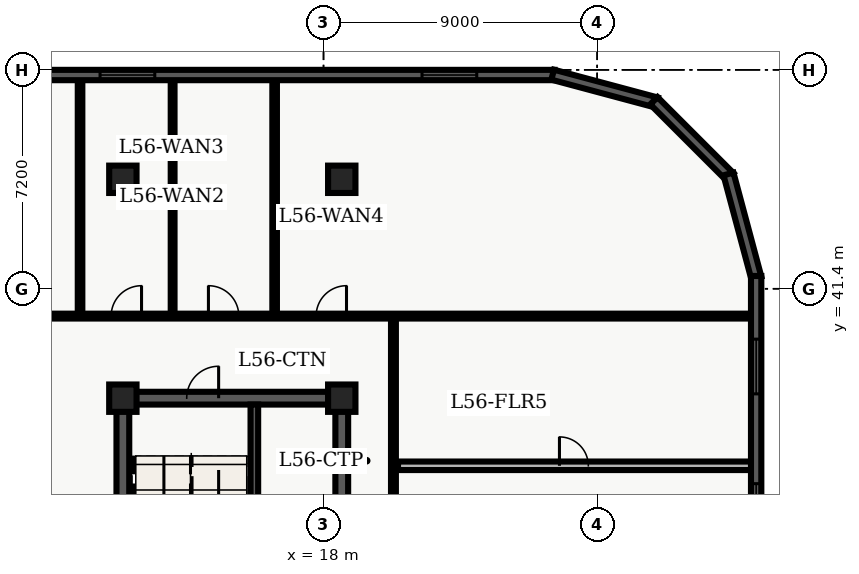
"""IFC4 building model, lengths in metres.
Left out: names, types, materials, properties, quantities, classifications, styles, units other than length and angle.
Written with IfcOpenShell. Run it as: python <this file> out.ifc"""

import sys

from ifc_helpers import new_model, entity, si_unit, converted_unit, direction, frame, origin_with_axes, origin_2d_with_axis, place, context, subcontext, project, spatial, polyline, rectangle, outline, extrude, element, fill, save


model = new_model("IFC4")
c1 = context("Model", 3, precision=1e-05, world=origin_with_axes(), true_north=direction((0.0, 1.0)))
c2 = subcontext(c1, "Body", "Model", "MODEL_VIEW")
j1 = project(units=[si_unit("LENGTHUNIT", "METRE"), converted_unit("PLANEANGLEUNIT", "DEGREE", entity("IfcPlaneAngleMeasure", 0.017), si_unit("PLANEANGLEUNIT", "RADIAN"), dimensions=[0, 0, 0, 0, 0, 0, 0])], contexts=[c1])
p1 = place(None, origin_with_axes())
s1 = spatial("IfcSite", under=j1, at=p1, CompositionType="ELEMENT")
p2 = place(p1, origin_with_axes())
s2 = spatial("IfcBuilding", under=s1, at=p2, CompositionType="ELEMENT")
p3 = place(p2, frame((0.0, 0.0, 228.6), z_axis=(0.0, 0.0, 1.0), x_axis=(1.0, 0.0, 0.0)))
s3 = spatial("IfcBuildingStorey", under=s2, at=p3, CompositionType="ELEMENT", Elevation=228.6)
p4 = place(p3, frame((11.4, 10.8, 0.0), z_axis=(0.0, 0.0, 1.0), x_axis=(0.0, 1.0, 0.0)))
e1 = element("IfcWall", 1, at=p4, inside=s3, PredefinedType="SHEAR", context=c2, shape_type="SweptSolid", body=[
    extrude(outline(polyline([(0.0, -0.21), (27.0, -0.21), (27.0, 0.21), (0.0, 0.21), (0.0, -0.21)])), origin_with_axes(), (0.0, 0.0, 1.0), 3.66),
])
p5 = place(p3, frame((11.4, 37.8, 0.0), z_axis=(0.0, 0.0, 1.0), x_axis=(1.0, 0.0, 0.0)))
e2 = element("IfcWall", 2, at=p5, inside=s3, PredefinedType="SHEAR", context=c2, shape_type="SweptSolid", body=[
    extrude(outline(polyline([(0.0, -0.21), (7.2, -0.21), (7.2, 0.21), (0.0, 0.21), (0.0, -0.21)])), origin_with_axes(), (0.0, 0.0, 1.0), 3.66),
])
p6 = place(p5, frame((2.625, 0.0, 0.0), z_axis=(0.0, 0.0, 1.0), x_axis=(1.0, 0.0, 0.0)))
e3 = element("IfcOpeningElement", 3, at=p6, cuts=e2, PredefinedType="OPENING", context=c2, shape_type="SweptSolid", body=[
    extrude(rectangle(XDim=1.05, YDim=0.44, at=origin_2d_with_axis()), origin_with_axes(), (0.0, 0.0, 1.0), 2.15),
])
p7 = place(p3, frame((18.6, 24.3, 0.0), z_axis=(0.0, 0.0, 1.0), x_axis=(0.0, 1.0, 0.0)))
e4 = element("IfcWall", 4, at=p7, inside=s3, PredefinedType="SHEAR", context=c2, shape_type="SweptSolid", body=[
    extrude(outline(polyline([(0.0, -0.21), (13.5, -0.21), (13.5, 0.21), (0.0, 0.21), (0.0, -0.21)])), origin_with_axes(), (0.0, 0.0, 1.0), 3.66),
])
p8 = place(p7, frame((8.525, 0.0, 0.0), z_axis=(0.0, 0.0, 1.0), x_axis=(1.0, 0.0, 0.0)))
e5 = element("IfcOpeningElement", 5, at=p8, cuts=e4, PredefinedType="OPENING", context=c2, shape_type="SweptSolid", body=[
    extrude(rectangle(XDim=1.05, YDim=0.44, at=origin_2d_with_axis()), origin_with_axes(), (0.0, 0.0, 1.0), 2.15),
])
p9 = place(p3, frame((15.725, 28.9, 0.0), z_axis=(0.0, 0.0, 1.0), x_axis=(0.0, 1.0, 0.0)))
e6 = element("IfcWall", 6, at=p9, inside=s3, PredefinedType="SHEAR", context=c2, shape_type="SweptSolid", body=[
    extrude(outline(polyline([(0.0, -0.125), (8.69, -0.125), (8.69, 0.125), (0.0, 0.125), (0.0, -0.125)])), origin_with_axes(), (0.0, 0.0, 1.0), 3.66),
])
for number, where, z_axis, x_axis in (
    (7, (11.4, 37.8, 0.0), (0.0, 0.0, 1.0), (1.0, 0.0, 0.0)),
    (8, (11.4, 45.0, 0.0), (0.0, 0.0, 1.0), (1.0, 0.0, 0.0)),
    (9, (18.6, 37.8, 0.0), (0.0, 0.0, 1.0), (1.0, 0.0, 0.0)),
    (10, (18.6, 45.0, 0.0), (0.0, 0.0, 1.0), (1.0, 0.0, 0.0)),
):
    element("IfcColumn", number, at=place(p3, frame(where, z_axis=z_axis, x_axis=x_axis)), inside=s3, PredefinedType="COLUMN", context=c2, shape_type="SweptSolid", body=[
        extrude(rectangle(XDim=0.9, YDim=0.9, at=origin_2d_with_axis()), origin_with_axes(), (0.0, 0.0, 1.0), 3.9),
    ])
p10 = place(p3, frame((7.1, 40.5, 0.0), z_axis=(0.0, 0.0, 1.0), x_axis=(1.0, 0.0, 0.0)))
e11 = element("IfcWall", 11, at=p10, inside=s3, PredefinedType="PARTITIONING", context=c2, shape_type="SweptSolid", body=[
    extrude(outline(polyline([(0.0, -0.08), (24.965, -0.08), (24.965, 0.08), (0.0, 0.08), (0.0, -0.08)])), origin_with_axes(), (0.0, 0.0, 1.0), 2.7),
])
p11 = place(p10, frame((1.441, 0.0, 0.0), z_axis=(0.0, 0.0, 1.0), x_axis=(1.0, 0.0, 0.0)))
e12 = element("IfcOpeningElement", 12, at=p11, cuts=e11, PredefinedType="OPENING", context=c2, shape_type="SweptSolid", body=[
    extrude(rectangle(XDim=1.0, YDim=0.18, at=origin_2d_with_axis()), origin_with_axes(), (0.0, 0.0, 1.0), 2.15),
])
p12 = place(p10, frame((4.415, 0.0, 0.0), z_axis=(0.0, 0.0, 1.0), x_axis=(1.0, 0.0, 0.0)))
e13 = element("IfcOpeningElement", 13, at=p12, cuts=e11, PredefinedType="OPENING", context=c2, shape_type="SweptSolid", body=[
    extrude(rectangle(XDim=1.0, YDim=0.18, at=origin_2d_with_axis()), origin_with_axes(), (0.0, 0.0, 1.0), 2.15),
])
p13 = place(p10, frame((7.614, 0.0, 0.0), z_axis=(0.0, 0.0, 1.0), x_axis=(1.0, 0.0, 0.0)))
e14 = element("IfcOpeningElement", 14, at=p13, cuts=e11, PredefinedType="OPENING", context=c2, shape_type="SweptSolid", body=[
    extrude(rectangle(XDim=1.0, YDim=0.18, at=origin_2d_with_axis()), origin_with_axes(), (0.0, 0.0, 1.0), 2.15),
])
p14 = place(p10, frame((11.156, 0.0, 0.0), z_axis=(0.0, 0.0, 1.0), x_axis=(1.0, 0.0, 0.0)))
e15 = element("IfcOpeningElement", 15, at=p14, cuts=e11, PredefinedType="OPENING", context=c2, shape_type="SweptSolid", body=[
    extrude(rectangle(XDim=1.0, YDim=0.18, at=origin_2d_with_axis()), origin_with_axes(), (0.0, 0.0, 1.0), 2.15),
])
p15 = place(p3, frame((20.3, 7.8, 0.0), z_axis=(0.0, 0.0, 1.0), x_axis=(0.0, 1.0, 0.0)))
e16 = element("IfcWall", 16, at=p15, inside=s3, PredefinedType="PARTITIONING", context=c2, shape_type="SweptSolid", body=[
    extrude(outline(polyline([(0.0, -0.08), (32.7, -0.08), (32.7, 0.08), (0.0, 0.08), (0.0, -0.08)])), origin_with_axes(), (0.0, 0.0, 1.0), 2.7),
])
p16 = place(p15, frame((14.556, 0.0, 0.0), z_axis=(0.0, 0.0, 1.0), x_axis=(1.0, 0.0, 0.0)))
e17 = element("IfcOpeningElement", 17, at=p16, cuts=e16, PredefinedType="OPENING", context=c2, shape_type="SweptSolid", body=[
    extrude(rectangle(XDim=0.9, YDim=0.18, at=origin_2d_with_axis()), origin_with_axes(), (0.0, 0.0, 1.0), 2.15),
])
p17 = place(p15, frame((18.551, 0.0, 0.0), z_axis=(0.0, 0.0, 1.0), x_axis=(1.0, 0.0, 0.0)))
e18 = element("IfcOpeningElement", 18, at=p17, cuts=e16, PredefinedType="OPENING", context=c2, shape_type="SweptSolid", body=[
    extrude(rectangle(XDim=1.0, YDim=0.18, at=origin_2d_with_axis()), origin_with_axes(), (0.0, 0.0, 1.0), 2.15),
])
p18 = place(p15, frame((22.226, 0.0, 0.0), z_axis=(0.0, 0.0, 1.0), x_axis=(1.0, 0.0, 0.0)))
e19 = element("IfcOpeningElement", 19, at=p18, cuts=e16, PredefinedType="OPENING", context=c2, shape_type="SweptSolid", body=[
    extrude(rectangle(XDim=1.0, YDim=0.18, at=origin_2d_with_axis()), origin_with_axes(), (0.0, 0.0, 1.0), 2.15),
])
p19 = place(p15, frame((25.754, 0.0, 0.0), z_axis=(0.0, 0.0, 1.0), x_axis=(1.0, 0.0, 0.0)))
e20 = element("IfcOpeningElement", 20, at=p19, cuts=e16, PredefinedType="OPENING", context=c2, shape_type="SweptSolid", body=[
    extrude(rectangle(XDim=1.0, YDim=0.18, at=origin_2d_with_axis()), origin_with_axes(), (0.0, 0.0, 1.0), 2.15),
])
p20 = place(p15, frame((5.775, 0.0, 0.0), z_axis=(0.0, 0.0, 1.0), x_axis=(1.0, 0.0, 0.0)))
e21 = element("IfcOpeningElement", 21, at=p20, cuts=e16, PredefinedType="OPENING", context=c2, shape_type="SweptSolid", body=[
    extrude(rectangle(XDim=1.05, YDim=0.18, at=origin_2d_with_axis()), origin_with_axes(), (0.0, 0.0, 1.0), 2.15),
])
p21 = place(p3, frame((9.992, 40.6, 0.0), z_axis=(0.0, 0.0, 1.0), x_axis=(0.0, 1.0, 0.0)))
e22 = element("IfcWall", 22, at=p21, inside=s3, PredefinedType="PARTITIONING", context=c2, shape_type="SweptSolid", body=[
    extrude(outline(polyline([(0.0, -0.075), (7.665, -0.075), (7.665, 0.075), (0.0, 0.075), (0.0, -0.075)])), origin_with_axes(), (0.0, 0.0, 1.0), 2.7),
])
p22 = place(p3, frame((13.037, 40.6, 0.0), z_axis=(0.0, 0.0, 1.0), x_axis=(0.0, 1.0, 0.0)))
e23 = element("IfcWall", 23, at=p22, inside=s3, PredefinedType="PARTITIONING", context=c2, shape_type="SweptSolid", body=[
    extrude(outline(polyline([(0.0, -0.062), (7.665, -0.062), (7.665, 0.062), (0.0, 0.062), (0.0, -0.062)])), origin_with_axes(), (0.0, 0.0, 1.0), 2.7),
])
p23 = place(p3, frame((16.392, 40.6, 0.0), z_axis=(0.0, 0.0, 1.0), x_axis=(0.0, 1.0, 0.0)))
e24 = element("IfcWall", 24, at=p23, inside=s3, PredefinedType="PARTITIONING", context=c2, shape_type="SweptSolid", body=[
    extrude(outline(polyline([(0.0, -0.075), (7.665, -0.075), (7.665, 0.075), (0.0, 0.075), (0.0, -0.075)])), origin_with_axes(), (0.0, 0.0, 1.0), 2.7),
])
p24 = place(p3, frame((20.45, 35.576, 0.0), z_axis=(0.0, 0.0, 1.0), x_axis=(1.0, 0.0, 0.0)))
e25 = element("IfcWall", 25, at=p24, inside=s3, PredefinedType="PARTITIONING", context=c2, shape_type="SweptSolid", body=[
    extrude(outline(polyline([(0.0, -0.14), (11.615, -0.14), (11.615, 0.14), (0.0, 0.14), (0.0, -0.14)])), origin_with_axes(), (0.0, 0.0, 1.0), 2.7),
])
p25 = place(p24, frame((5.785, 0.0, 0.0), z_axis=(0.0, 0.0, 1.0), x_axis=(1.0, 0.0, 0.0)))
e26 = element("IfcOpeningElement", 26, at=p25, cuts=e25, PredefinedType="OPENING", context=c2, shape_type="SweptSolid", body=[
    extrude(rectangle(XDim=0.95, YDim=0.3, at=origin_2d_with_axis()), origin_with_axes(), (0.0, 0.0, 1.0), 2.15),
])
p26 = place(p3, frame((7.24, 48.43, 0.0), z_axis=(0.0, 0.0, 1.0), x_axis=(1.0, 0.0, 0.0)))
e27 = element("IfcWall", 27, at=p26, inside=s3, PredefinedType="SOLIDWALL", context=c2, shape_type="SweptSolid", body=[
    extrude(outline(polyline([(0.0, -0.17), (18.36, -0.17), (18.36, 0.17), (0.0, 0.17), (0.0, -0.17)])), origin_with_axes(), (0.0, 0.0, 1.0), 3.66),
])
p27 = place(p26, frame((4.31, 0.0, 0.45), z_axis=(0.0, 0.0, 1.0), x_axis=(1.0, 0.0, 0.0)))
e28 = element("IfcOpeningElement", 28, at=p27, cuts=e27, PredefinedType="OPENING", context=c2, shape_type="SweptSolid", body=[
    extrude(rectangle(XDim=1.8, YDim=0.36, at=origin_2d_with_axis()), origin_with_axes(), (0.0, 0.0, 1.0), 2.1),
])
p28 = place(p26, frame((14.9, 0.0, 0.45), z_axis=(0.0, 0.0, 1.0), x_axis=(1.0, 0.0, 0.0)))
e29 = element("IfcOpeningElement", 29, at=p28, cuts=e27, PredefinedType="OPENING", context=c2, shape_type="SweptSolid", body=[
    extrude(rectangle(XDim=1.8, YDim=0.36, at=origin_2d_with_axis()), origin_with_axes(), (0.0, 0.0, 1.0), 2.1),
])
p29 = place(p3, frame((25.537, 48.441, 0.0), z_axis=(0.0, 0.0, 1.0), x_axis=(0.965934, -0.258788, 0.0)))
e30 = element("IfcWall", 30, at=p29, inside=s3, PredefinedType="SOLIDWALL", context=c2, shape_type="SweptSolid", body=[
    extrude(outline(polyline([(0.0, -0.17), (3.54, -0.17), (3.54, 0.17), (0.0, 0.17), (0.0, -0.17)])), origin_with_axes(), (0.0, 0.0, 1.0), 3.66),
])
p30 = place(p3, frame((28.866, 47.583, 0.0), z_axis=(0.0, 0.0, 1.0), x_axis=(0.707107, -0.707107, 0.0)))
e31 = element("IfcWall", 31, at=p30, inside=s3, PredefinedType="SOLIDWALL", context=c2, shape_type="SweptSolid", body=[
    extrude(outline(polyline([(0.0, -0.17), (3.54, -0.17), (3.54, 0.17), (0.0, 0.17), (0.0, -0.17)])), origin_with_axes(), (0.0, 0.0, 1.0), 3.66),
])
p31 = place(p3, frame((31.32, 45.175, 0.0), z_axis=(0.0, 0.0, 1.0), x_axis=(0.258788, -0.965934, 0.0)))
e32 = element("IfcWall", 32, at=p31, inside=s3, PredefinedType="SOLIDWALL", context=c2, shape_type="SweptSolid", body=[
    extrude(outline(polyline([(0.0, -0.17), (3.54, -0.17), (3.54, 0.17), (0.0, 0.17), (0.0, -0.17)])), origin_with_axes(), (0.0, 0.0, 1.0), 3.66),
])
p32 = place(p3, frame((32.23, 41.82, 0.0), z_axis=(0.0, 0.0, 1.0), x_axis=(0.0, -1.0, 0.0)))
e33 = element("IfcWall", 33, at=p32, inside=s3, PredefinedType="SOLIDWALL", context=c2, shape_type="SweptSolid", body=[
    extrude(outline(polyline([(0.0, -0.17), (20.22, -0.17), (20.22, 0.17), (0.0, 0.17), (0.0, -0.17)])), origin_with_axes(), (0.0, 0.0, 1.0), 3.66),
])
p33 = place(p32, frame((2.978, 0.0, 0.45), z_axis=(0.0, 0.0, 1.0), x_axis=(1.0, 0.0, 0.0)))
e34 = element("IfcOpeningElement", 34, at=p33, cuts=e33, PredefinedType="OPENING", context=c2, shape_type="SweptSolid", body=[
    extrude(rectangle(XDim=1.8, YDim=0.36, at=origin_2d_with_axis()), origin_with_axes(), (0.0, 0.0, 1.0), 2.1),
])
p34 = place(p32, frame((7.732, 0.0, 0.45), z_axis=(0.0, 0.0, 1.0), x_axis=(1.0, 0.0, 0.0)))
e35 = element("IfcOpeningElement", 35, at=p34, cuts=e33, PredefinedType="OPENING", context=c2, shape_type="SweptSolid", body=[
    extrude(rectangle(XDim=1.8, YDim=0.36, at=origin_2d_with_axis()), origin_with_axes(), (0.0, 0.0, 1.0), 2.1),
])
p35 = place(p32, frame((12.037, 0.0, 0.45), z_axis=(0.0, 0.0, 1.0), x_axis=(1.0, 0.0, 0.0)))
e36 = element("IfcOpeningElement", 36, at=p35, cuts=e33, PredefinedType="OPENING", context=c2, shape_type="SweptSolid", body=[
    extrude(rectangle(XDim=1.8, YDim=0.36, at=origin_2d_with_axis()), origin_with_axes(), (0.0, 0.0, 1.0), 2.1),
])
p36 = place(p5, frame((2.625, 0.0, 0.0), z_axis=(0.0, 0.0, 1.0), x_axis=(1.0, 0.0, 0.0)))
e37 = element("IfcDoor", 37, at=p36, inside=s3, OperationType="SINGLE_SWING_RIGHT", PredefinedType="DOOR", context=c2, shape_type="SweptSolid", body=[
    extrude(rectangle(XDim=1.05, YDim=0.09, at=origin_2d_with_axis()), origin_with_axes(), (0.0, 0.0, 1.0), 2.15),
])
fill(e3, e37)
p37 = place(p10, frame((4.415, 0.0, 0.0), z_axis=(0.0, 0.0, 1.0), x_axis=(1.0, 0.0, 0.0)))
e38 = element("IfcDoor", 38, at=p37, inside=s3, OperationType="SINGLE_SWING_RIGHT", PredefinedType="DOOR", context=c2, shape_type="SweptSolid", body=[
    extrude(rectangle(XDim=1.0, YDim=0.09, at=origin_2d_with_axis()), origin_with_axes(), (0.0, 0.0, 1.0), 2.15),
])
fill(e13, e38)
p38 = place(p10, frame((7.614, 0.0, 0.0), z_axis=(0.0, 0.0, 1.0), x_axis=(1.0, 0.0, 0.0)))
e39 = element("IfcDoor", 39, at=p38, inside=s3, OperationType="SINGLE_SWING_LEFT", PredefinedType="DOOR", context=c2, shape_type="SweptSolid", body=[
    extrude(rectangle(XDim=1.0, YDim=0.09, at=origin_2d_with_axis()), origin_with_axes(), (0.0, 0.0, 1.0), 2.15),
])
fill(e14, e39)
p39 = place(p10, frame((11.156, 0.0, 0.0), z_axis=(0.0, 0.0, 1.0), x_axis=(1.0, 0.0, 0.0)))
e40 = element("IfcDoor", 40, at=p39, inside=s3, OperationType="SINGLE_SWING_RIGHT", PredefinedType="DOOR", context=c2, shape_type="SweptSolid", body=[
    extrude(rectangle(XDim=1.0, YDim=0.09, at=origin_2d_with_axis()), origin_with_axes(), (0.0, 0.0, 1.0), 2.15),
])
fill(e15, e40)
p40 = place(p24, frame((5.785, 0.0, 0.0), z_axis=(0.0, 0.0, 1.0), x_axis=(1.0, 0.0, 0.0)))
e41 = element("IfcDoor", 41, at=p40, inside=s3, OperationType="SINGLE_SWING_LEFT", PredefinedType="DOOR", context=c2, shape_type="SweptSolid", body=[
    extrude(rectangle(XDim=0.95, YDim=0.09, at=origin_2d_with_axis()), origin_with_axes(), (0.0, 0.0, 1.0), 2.15),
])
fill(e26, e41)
p41 = place(p26, frame((4.31, 0.0, 0.45), z_axis=(0.0, 0.0, 1.0), x_axis=(1.0, 0.0, 0.0)))
e42 = element("IfcWindow", 42, at=p41, inside=s3, PredefinedType="WINDOW", context=c2, shape_type="SweptSolid", body=[
    extrude(rectangle(XDim=1.8, YDim=0.09, at=origin_2d_with_axis()), origin_with_axes(), (0.0, 0.0, 1.0), 2.1),
])
fill(e28, e42)
p42 = place(p26, frame((14.9, 0.0, 0.45), z_axis=(0.0, 0.0, 1.0), x_axis=(1.0, 0.0, 0.0)))
e43 = element("IfcWindow", 43, at=p42, inside=s3, PredefinedType="WINDOW", context=c2, shape_type="SweptSolid", body=[
    extrude(rectangle(XDim=1.8, YDim=0.09, at=origin_2d_with_axis()), origin_with_axes(), (0.0, 0.0, 1.0), 2.1),
])
fill(e29, e43)
p43 = place(p32, frame((2.978, 0.0, 0.45), z_axis=(0.0, 0.0, 1.0), x_axis=(1.0, 0.0, 0.0)))
e44 = element("IfcWindow", 44, at=p43, inside=s3, PredefinedType="WINDOW", context=c2, shape_type="SweptSolid", body=[
    extrude(rectangle(XDim=1.8, YDim=0.09, at=origin_2d_with_axis()), origin_with_axes(), (0.0, 0.0, 1.0), 2.1),
])
fill(e34, e44)
p44 = place(p32, frame((7.732, 0.0, 0.45), z_axis=(0.0, 0.0, 1.0), x_axis=(1.0, 0.0, 0.0)))
e45 = element("IfcWindow", 45, at=p44, inside=s3, PredefinedType="WINDOW", context=c2, shape_type="SweptSolid", body=[
    extrude(rectangle(XDim=1.8, YDim=0.09, at=origin_2d_with_axis()), origin_with_axes(), (0.0, 0.0, 1.0), 2.1),
])
fill(e35, e45)
save(model, sys.argv[1])
